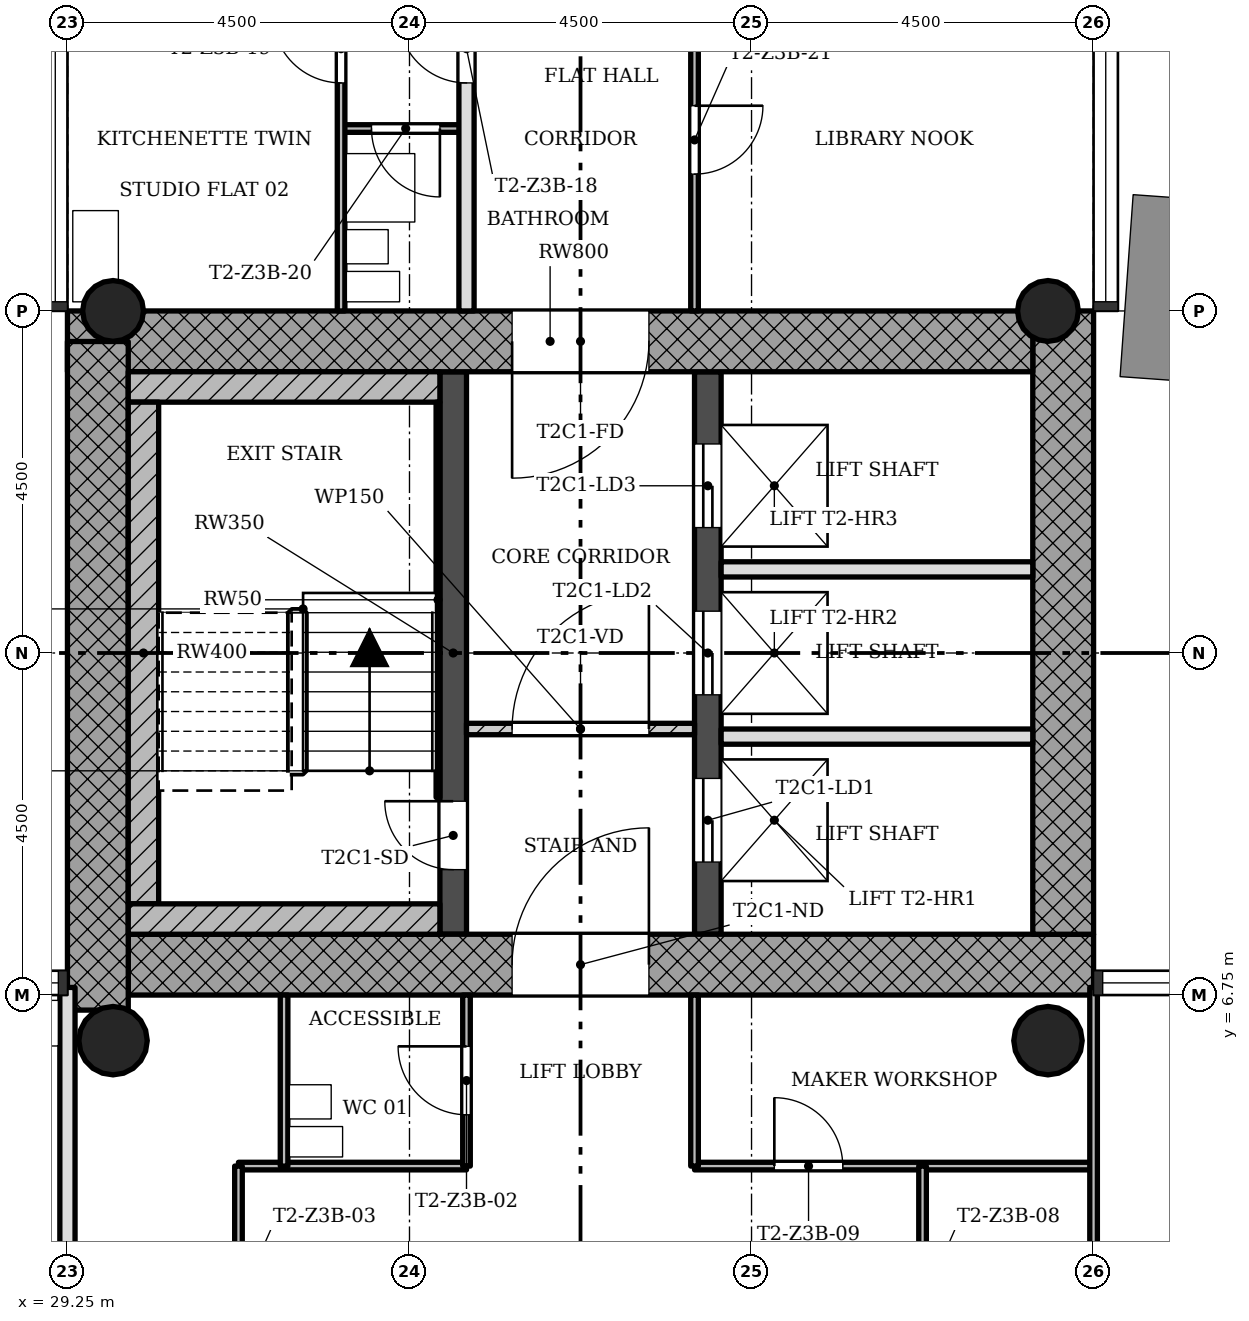
"""IFC4 building model, lengths in metres.
Left out: names, types, materials, properties, quantities, classifications, styles, units other than length and angle.
Written with IfcOpenShell. Run it as: python <this file> out.ifc"""

import sys

from ifc_helpers import new_model, si_unit, direction, frame, frame_2d, origin, origin_2d, place, context, subcontext, project, spatial, rectangle, hollow_circle, extrude, element, fill, save


model = new_model("IFC4")
c1 = context("Model", 3, precision=1e-05, world=origin(), true_north=direction((0.0, 1.0)))
c2 = subcontext(c1, "Body", "Model", "MODEL_VIEW")
j1 = project(units=[si_unit("LENGTHUNIT", "METRE"), si_unit("PLANEANGLEUNIT", "RADIAN")], contexts=[c1])
p1 = place(None, origin())
s1 = spatial("IfcSite", under=j1, at=p1, CompositionType="ELEMENT")
p2 = place(p1, origin())
s2 = spatial("IfcBuilding", under=s1, at=p2, CompositionType="ELEMENT")
p3 = place(p2, frame((0.0, 0.0, 150.7)))
s3 = spatial("IfcBuildingStorey", under=s2, at=p3, CompositionType="ELEMENT", Elevation=150.7)
p4 = place(p3, frame((30.05, 7.15, 0.0), z_axis=(0.0, 0.0, 1.0), x_axis=(1.0, 0.0, 0.0)))
e1 = element("IfcWall", 1, at=p4, inside=s3, PredefinedType="SHEAR", context=c2, shape_type="SweptSolid", body=[
    extrude(rectangle(XDim=12.7, YDim=0.8, at=frame_2d((6.35, 0.0))), origin(), (0.0, 0.0, 1.0), 3.4),
])
p5 = place(p4, frame((5.05, 0.0, 0.0)))
e2 = element("IfcOpeningElement", 2, at=p5, cuts=e1, PredefinedType="OPENING", context=c2, shape_type="SweptSolid", body=[
    extrude(rectangle(XDim=1.8, YDim=2.1, at=frame_2d((0.9, 1.05))), frame((0.0, 0.41, 0.0), z_axis=(0.0, -1.0, 0.0), x_axis=(1.0, 0.0, 0.0)), (0.0, 0.0, 1.0), 0.82),
])
p6 = place(p3, frame((42.35, 7.55, 0.0), z_axis=(0.0, 0.0, 1.0), x_axis=(0.0, 1.0, 0.0)))
e3 = element("IfcWall", 3, at=p6, inside=s3, PredefinedType="SHEAR", context=c2, shape_type="SweptSolid", body=[
    extrude(rectangle(XDim=8.2, YDim=0.8, at=frame_2d((4.1, 0.0))), origin(), (0.0, 0.0, 1.0), 3.4),
])
p7 = place(p3, frame((41.95, 15.35, 0.0), z_axis=(0.0, 0.0, 1.0), x_axis=(-1.0, 0.0, 0.0)))
e4 = element("IfcWall", 4, at=p7, inside=s3, PredefinedType="SHEAR", context=c2, shape_type="SweptSolid", body=[
    extrude(rectangle(XDim=12.7, YDim=0.8, at=frame_2d((6.35, 0.0))), origin(), (0.0, 0.0, 1.0), 3.4),
])
p8 = place(p7, frame((5.05, 0.0, 0.0)))
e5 = element("IfcOpeningElement", 5, at=p8, cuts=e4, PredefinedType="OPENING", context=c2, shape_type="SweptSolid", body=[
    extrude(rectangle(XDim=1.8, YDim=2.1, at=frame_2d((0.9, 1.05))), frame((0.0, 0.41, 0.0), z_axis=(0.0, -1.0, 0.0), x_axis=(1.0, 0.0, 0.0)), (0.0, 0.0, 1.0), 0.82),
])
p9 = place(p3, frame((29.65, 15.348, 0.0), z_axis=(0.0, 0.0, 1.0), x_axis=(0.0, -1.0, 0.0)))
e6 = element("IfcWall", 6, at=p9, inside=s3, PredefinedType="SHEAR", context=c2, shape_type="SweptSolid", body=[
    extrude(rectangle(XDim=8.796, YDim=0.8, at=frame_2d((4.398, 0.0))), origin(), (0.0, 0.0, 1.0), 3.4),
])
p10 = place(p3, frame((34.325, 7.55, 0.0), z_axis=(0.0, 0.0, 1.0), x_axis=(0.0, 1.0, 0.0)))
e7 = element("IfcWall", 7, at=p10, inside=s3, PredefinedType="SHEAR", context=c2, shape_type="SweptSolid", body=[
    extrude(rectangle(XDim=7.4, YDim=0.35, at=frame_2d((3.7, 0.0))), origin(), (0.0, 0.0, 1.0), 3.4),
])
p11 = place(p10, frame((0.85, 0.0, 0.0)))
e8 = element("IfcOpeningElement", 8, at=p11, cuts=e7, PredefinedType="OPENING", context=c2, shape_type="SweptSolid", body=[
    extrude(rectangle(XDim=0.9, YDim=2.1, at=frame_2d((0.45, 1.05))), frame((0.0, 0.185, 0.0), z_axis=(0.0, -1.0, 0.0), x_axis=(1.0, 0.0, 0.0)), (0.0, 0.0, 1.0), 0.37),
])
p12 = place(p3, frame((37.675, 7.55, 0.0), z_axis=(0.0, 0.0, 1.0), x_axis=(0.0, 1.0, 0.0)))
e9 = element("IfcWall", 9, at=p12, inside=s3, PredefinedType="SHEAR", context=c2, shape_type="SweptSolid", body=[
    extrude(rectangle(XDim=7.4, YDim=0.35, at=frame_2d((3.7, 0.0))), origin(), (0.0, 0.0, 1.0), 3.4),
])
p13 = place(p12, frame((0.95, 0.0, 0.0)))
e10 = element("IfcOpeningElement", 10, at=p13, cuts=e9, PredefinedType="OPENING", context=c2, shape_type="SweptSolid", body=[
    extrude(rectangle(XDim=1.1, YDim=2.1, at=frame_2d((0.55, 1.05))), frame((0.0, 0.185, 0.0), z_axis=(0.0, -1.0, 0.0), x_axis=(1.0, 0.0, 0.0)), (0.0, 0.0, 1.0), 0.37),
])
p14 = place(p12, frame((3.15, 0.0, 0.0)))
e11 = element("IfcOpeningElement", 11, at=p14, cuts=e9, PredefinedType="OPENING", context=c2, shape_type="SweptSolid", body=[
    extrude(rectangle(XDim=1.1, YDim=2.1, at=frame_2d((0.55, 1.05))), frame((0.0, 0.185, 0.0), z_axis=(0.0, -1.0, 0.0), x_axis=(1.0, 0.0, 0.0)), (0.0, 0.0, 1.0), 0.37),
])
p15 = place(p12, frame((5.35, 0.0, 0.0)))
e12 = element("IfcOpeningElement", 12, at=p15, cuts=e9, PredefinedType="OPENING", context=c2, shape_type="SweptSolid", body=[
    extrude(rectangle(XDim=1.1, YDim=2.1, at=frame_2d((0.55, 1.05))), frame((0.0, 0.185, 0.0), z_axis=(0.0, -1.0, 0.0), x_axis=(1.0, 0.0, 0.0)), (0.0, 0.0, 1.0), 0.37),
])
for number, where, z_axis, x_axis in (
    (13, (42.15, 15.75, 0.0), (0.0, 0.0, 1.0), (1.0, 0.0, 0.0)),
    (14, (29.85, 15.75, 0.0), (0.0, 0.0, 1.0), (1.0, 0.0, 0.0)),
):
    element("IfcColumn", number, at=place(p3, frame(where, z_axis=z_axis, x_axis=x_axis)), inside=s3, PredefinedType="COLUMN", context=c2, shape_type="SweptSolid", body=[
        extrude(hollow_circle(Radius=0.4, WallThickness=0.028, at=origin_2d()), origin(), (0.0, 0.0, 1.0), 3.4),
    ])
for number, where, z_axis, x_axis in (
    (15, (42.15, 6.15, 0.0), (0.0, 0.0, 1.0), (1.0, 0.0, 0.0)),
    (16, (29.85, 6.15, 0.0), (0.0, 0.0, 1.0), (1.0, 0.0, 0.0)),
):
    element("IfcColumn", number, at=place(p3, frame(where, z_axis=z_axis, x_axis=x_axis)), inside=s3, PredefinedType="COLUMN", context=c2, shape_type="SweptSolid", body=[
        extrude(hollow_circle(Radius=0.45, WallThickness=0.032, at=origin_2d()), origin(), (0.0, 0.0, 1.0), 3.4),
    ])
p16 = place(p3, frame((37.5, 10.25, 0.0), z_axis=(0.0, 0.0, 1.0), x_axis=(-1.0, 0.0, 0.0)))
e17 = element("IfcWall", 17, at=p16, inside=s3, PredefinedType="PARTITIONING", context=c2, shape_type="SweptSolid", body=[
    extrude(rectangle(XDim=3.0, YDim=0.15, at=frame_2d((1.5, 0.0))), origin(), (0.0, 0.0, 1.0), 3.0),
])
p17 = place(p16, frame((0.6, 0.0, 0.0)))
e18 = element("IfcOpeningElement", 18, at=p17, cuts=e17, PredefinedType="OPENING", context=c2, shape_type="SweptSolid", body=[
    extrude(rectangle(XDim=1.8, YDim=2.1, at=frame_2d((0.9, 1.05))), frame((0.0, 0.085, 0.0), z_axis=(0.0, -1.0, 0.0), x_axis=(1.0, 0.0, 0.0)), (0.0, 0.0, 1.0), 0.17),
])
for number, where, z_axis, x_axis in (
    (19, (41.95, 10.15, 0.0), (0.0, 0.0, 1.0), (-1.0, 0.0, 0.0)),
    (20, (41.95, 12.35, 0.0), (0.0, 0.0, 1.0), (-1.0, 0.0, 0.0)),
):
    element("IfcWall", number, at=place(p3, frame(where, z_axis=z_axis, x_axis=x_axis)), inside=s3, PredefinedType="SOLIDWALL", context=c2, shape_type="SweptSolid", body=[
        extrude(rectangle(XDim=4.1, YDim=0.2, at=frame_2d((2.05, 0.0))), origin(), (0.0, 0.0, 1.0), 3.0),
    ])
p18 = place(p3, frame((42.75, 4.5, 0.0), z_axis=(0.0, 0.0, 1.0), x_axis=(-1.0, 0.0, 0.0)))
e21 = element("IfcWall", 21, at=p18, inside=s3, PredefinedType="PARTITIONING", context=c2, shape_type="SweptSolid", body=[
    extrude(rectangle(XDim=5.25, YDim=0.1, at=frame_2d((2.625, 0.0))), origin(), (0.0, 0.0, 1.0), 3.0),
])
p19 = place(p18, frame((3.3, 0.0, 0.0)))
e22 = element("IfcOpeningElement", 22, at=p19, cuts=e21, PredefinedType="OPENING", context=c2, shape_type="SweptSolid", body=[
    extrude(rectangle(XDim=0.9, YDim=2.1, at=frame_2d((0.45, 1.05))), frame((0.0, 0.06, 0.0), z_axis=(0.0, -1.0, 0.0), x_axis=(1.0, 0.0, 0.0)), (0.0, 0.0, 1.0), 0.12),
])
p20 = place(p3, frame((34.5, 4.5, 0.0), z_axis=(0.0, 0.0, 1.0), x_axis=(-1.0, 0.0, 0.0)))
e23 = element("IfcWall", 23, at=p20, inside=s3, PredefinedType="PARTITIONING", context=c2, shape_type="SweptSolid", body=[
    extrude(rectangle(XDim=3.0, YDim=0.1, at=frame_2d((1.5, 0.0))), origin(), (0.0, 0.0, 1.0), 3.0),
])
p21 = place(p3, frame((34.5, 18.15, 0.0), z_axis=(0.0, 0.0, 1.0), x_axis=(-1.0, 0.0, 0.0)))
e24 = element("IfcWall", 24, at=p21, inside=s3, PredefinedType="PARTITIONING", context=c2, shape_type="SweptSolid", body=[
    extrude(rectangle(XDim=1.65, YDim=0.1, at=frame_2d((0.825, 0.0))), origin(), (0.0, 0.0, 1.0), 3.0),
])
p22 = place(p21, frame((0.35, 0.0, 0.0)))
e25 = element("IfcOpeningElement", 25, at=p22, cuts=e24, PredefinedType="OPENING", context=c2, shape_type="SweptSolid", body=[
    extrude(rectangle(XDim=0.9, YDim=2.1, at=frame_2d((0.45, 1.05))), frame((0.0, 0.06, 0.0), z_axis=(0.0, -1.0, 0.0), x_axis=(1.0, 0.0, 0.0)), (0.0, 0.0, 1.0), 0.12),
])
p23 = place(p3, frame((42.75, 0.9, 0.0), z_axis=(0.0, 0.0, 1.0), x_axis=(0.0, 1.0, 0.0)))
e26 = element("IfcWall", 26, at=p23, inside=s3, PredefinedType="PARTITIONING", context=c2, shape_type="SweptSolid", body=[
    extrude(rectangle(XDim=5.95, YDim=0.1, at=frame_2d((2.975, 0.0))), origin(), (0.0, 0.0, 1.0), 3.0),
])
p24 = place(p3, frame((40.5, 0.9, 0.0), z_axis=(0.0, 0.0, 1.0), x_axis=(0.0, 1.0, 0.0)))
e27 = element("IfcWall", 27, at=p24, inside=s3, PredefinedType="PARTITIONING", context=c2, shape_type="SweptSolid", body=[
    extrude(rectangle(XDim=3.6, YDim=0.1, at=frame_2d((1.8, 0.0))), origin(), (0.0, 0.0, 1.0), 3.0),
])
p25 = place(p24, frame((1.35, 0.0, 0.0)))
e28 = element("IfcOpeningElement", 28, at=p25, cuts=e27, PredefinedType="OPENING", context=c2, shape_type="SweptSolid", body=[
    extrude(rectangle(XDim=0.9, YDim=2.1, at=frame_2d((0.45, 1.05))), frame((0.0, 0.06, 0.0), z_axis=(0.0, -1.0, 0.0), x_axis=(1.0, 0.0, 0.0)), (0.0, 0.0, 1.0), 0.12),
])
p26 = place(p3, frame((37.5, 4.5, 0.0), z_axis=(0.0, 0.0, 1.0), x_axis=(0.0, 1.0, 0.0)))
e29 = element("IfcWall", 29, at=p26, inside=s3, PredefinedType="PARTITIONING", context=c2, shape_type="SweptSolid", body=[
    extrude(rectangle(XDim=2.25, YDim=0.1, at=frame_2d((1.125, 0.0))), origin(), (0.0, 0.0, 1.0), 3.0),
])
p27 = place(p3, frame((37.5, 15.75, 0.0), z_axis=(0.0, 0.0, 1.0), x_axis=(0.0, 1.0, 0.0)))
e30 = element("IfcWall", 30, at=p27, inside=s3, PredefinedType="PARTITIONING", context=c2, shape_type="SweptSolid", body=[
    extrude(rectangle(XDim=4.5, YDim=0.1, at=frame_2d((2.25, 0.0))), origin(), (0.0, 0.0, 1.0), 3.0),
])
p28 = place(p27, frame((1.8, 0.0, 0.0)))
e31 = element("IfcOpeningElement", 31, at=p28, cuts=e30, PredefinedType="OPENING", context=c2, shape_type="SweptSolid", body=[
    extrude(rectangle(XDim=0.9, YDim=2.1, at=frame_2d((0.45, 1.05))), frame((0.0, 0.06, 0.0), z_axis=(0.0, -1.0, 0.0), x_axis=(1.0, 0.0, 0.0)), (0.0, 0.0, 1.0), 0.12),
])
p29 = place(p3, frame((34.5, 4.5, 0.0), z_axis=(0.0, 0.0, 1.0), x_axis=(0.0, 1.0, 0.0)))
e32 = element("IfcWall", 32, at=p29, inside=s3, PredefinedType="PARTITIONING", context=c2, shape_type="SweptSolid", body=[
    extrude(rectangle(XDim=2.25, YDim=0.1, at=frame_2d((1.125, 0.0))), origin(), (0.0, 0.0, 1.0), 3.0),
])
p30 = place(p29, frame((0.675, 0.0, 0.0)))
e33 = element("IfcOpeningElement", 33, at=p30, cuts=e32, PredefinedType="OPENING", context=c2, shape_type="SweptSolid", body=[
    extrude(rectangle(XDim=0.9, YDim=2.1, at=frame_2d((0.45, 1.05))), frame((0.0, 0.06, 0.0), z_axis=(0.0, -1.0, 0.0), x_axis=(1.0, 0.0, 0.0)), (0.0, 0.0, 1.0), 0.12),
])
p31 = place(p3, frame((34.5, 15.75, 0.0), z_axis=(0.0, 0.0, 1.0), x_axis=(0.0, 1.0, 0.0)))
e34 = element("IfcWall", 34, at=p31, inside=s3, PredefinedType="SOLIDWALL", context=c2, shape_type="SweptSolid", body=[
    extrude(rectangle(XDim=4.5, YDim=0.2, at=frame_2d((2.25, 0.0))), origin(), (0.0, 0.0, 1.0), 3.0),
])
p32 = place(p31, frame((3.0, 0.0, 0.0)))
e35 = element("IfcOpeningElement", 35, at=p32, cuts=e34, PredefinedType="OPENING", context=c2, shape_type="SweptSolid", body=[
    extrude(rectangle(XDim=0.9, YDim=2.1, at=frame_2d((0.45, 1.05))), frame((0.0, 0.11, 0.0), z_axis=(0.0, -1.0, 0.0), x_axis=(1.0, 0.0, 0.0)), (0.0, 0.0, 1.0), 0.22),
])
p33 = place(p3, frame((32.85, 15.75, 0.0), z_axis=(0.0, 0.0, 1.0), x_axis=(0.0, 1.0, 0.0)))
e36 = element("IfcWall", 36, at=p33, inside=s3, PredefinedType="PARTITIONING", context=c2, shape_type="SweptSolid", body=[
    extrude(rectangle(XDim=4.5, YDim=0.1, at=frame_2d((2.25, 0.0))), origin(), (0.0, 0.0, 1.0), 3.0),
])
p34 = place(p33, frame((3.0, 0.0, 0.0)))
e37 = element("IfcOpeningElement", 37, at=p34, cuts=e36, PredefinedType="OPENING", context=c2, shape_type="SweptSolid", body=[
    extrude(rectangle(XDim=0.9, YDim=2.1, at=frame_2d((0.45, 1.05))), frame((0.0, 0.06, 0.0), z_axis=(0.0, -1.0, 0.0), x_axis=(1.0, 0.0, 0.0)), (0.0, 0.0, 1.0), 0.12),
])
p35 = place(p3, frame((32.1, 4.5, 0.0), z_axis=(0.0, 0.0, 1.0), x_axis=(0.0, 1.0, 0.0)))
e38 = element("IfcWall", 38, at=p35, inside=s3, PredefinedType="PARTITIONING", context=c2, shape_type="SweptSolid", body=[
    extrude(rectangle(XDim=2.25, YDim=0.1, at=frame_2d((1.125, 0.0))), origin(), (0.0, 0.0, 1.0), 3.0),
])
p36 = place(p3, frame((31.5, 0.9, 0.0), z_axis=(0.0, 0.0, 1.0), x_axis=(0.0, 1.0, 0.0)))
e39 = element("IfcWall", 39, at=p36, inside=s3, PredefinedType="PARTITIONING", context=c2, shape_type="SweptSolid", body=[
    extrude(rectangle(XDim=3.6, YDim=0.1, at=frame_2d((1.8, 0.0))), origin(), (0.0, 0.0, 1.0), 3.0),
])
p37 = place(p36, frame((1.35, 0.0, 0.0)))
e40 = element("IfcOpeningElement", 40, at=p37, cuts=e39, PredefinedType="OPENING", context=c2, shape_type="SweptSolid", body=[
    extrude(rectangle(XDim=0.9, YDim=2.1, at=frame_2d((0.45, 1.05))), frame((0.0, 0.06, 0.0), z_axis=(0.0, -1.0, 0.0), x_axis=(1.0, 0.0, 0.0)), (0.0, 0.0, 1.0), 0.12),
])
p38 = place(p3, frame((29.25, 0.9, 0.0), z_axis=(0.0, 0.0, 1.0), x_axis=(0.0, 1.0, 0.0)))
e41 = element("IfcWall", 41, at=p38, inside=s3, PredefinedType="SOLIDWALL", context=c2, shape_type="SweptSolid", body=[
    extrude(rectangle(XDim=5.95, YDim=0.2, at=frame_2d((2.975, 0.0))), origin(), (0.0, 0.0, 1.0), 3.0),
])
p39 = place(p3, frame((34.15, 14.75, 0.0), z_axis=(0.0, 0.0, 1.0), x_axis=(-1.0, 0.0, 0.0)))
e42 = element("IfcWall", 42, at=p39, inside=s3, PredefinedType="SHEAR", context=c2, shape_type="SweptSolid", body=[
    extrude(rectangle(XDim=4.1, YDim=0.4, at=frame_2d((2.05, 0.0))), origin(), (0.0, 0.0, 1.0), 3.4),
])
p40 = place(p3, frame((30.25, 7.95, 0.0), z_axis=(0.0, 0.0, 1.0), x_axis=(0.0, 1.0, 0.0)))
e43 = element("IfcWall", 43, at=p40, inside=s3, PredefinedType="SHEAR", context=c2, shape_type="SweptSolid", body=[
    extrude(rectangle(XDim=6.6, YDim=0.4, at=frame_2d((3.3, 0.0))), origin(), (0.0, 0.0, 1.0), 3.4),
])
p41 = place(p3, frame((34.15, 7.75, 0.0), z_axis=(0.0, 0.0, 1.0), x_axis=(-1.0, 0.0, 0.0)))
e44 = element("IfcWall", 44, at=p41, inside=s3, PredefinedType="SHEAR", context=c2, shape_type="SweptSolid", body=[
    extrude(rectangle(XDim=4.1, YDim=0.4, at=frame_2d((2.05, 0.0))), origin(), (0.0, 0.0, 1.0), 3.4),
])
p42 = place(p3, frame((34.125, 9.35, 0.0), z_axis=(0.0, 0.0, 1.0), x_axis=(0.0, 1.0, 0.0)))
e45 = element("IfcWall", 45, at=p42, inside=s3, PredefinedType="SHEAR", context=c2, shape_type="SweptSolid", body=[
    extrude(rectangle(XDim=5.2, YDim=0.05, at=frame_2d((2.6, 0.0))), origin(), (0.0, 0.0, 1.0), 3.4),
])
p43 = place(p17, origin())
e46 = element("IfcDoor", 46, at=p43, inside=s3, OperationType="SINGLE_SWING_LEFT", PredefinedType="DOOR", context=c2, shape_type="SweptSolid", body=[
    extrude(rectangle(XDim=1.8, YDim=2.1, at=frame_2d((0.9, 1.05))), frame((0.0, 0.025, 0.0), z_axis=(0.0, -1.0, 0.0), x_axis=(1.0, 0.0, 0.0)), (0.0, 0.0, 1.0), 0.05),
])
fill(e18, e46)
p44 = place(p30, origin())
e47 = element("IfcDoor", 47, at=p44, inside=s3, OperationType="SINGLE_SWING_LEFT", PredefinedType="DOOR", context=c2, shape_type="SweptSolid", body=[
    extrude(rectangle(XDim=0.9, YDim=2.1, at=frame_2d((0.45, 1.05))), frame((0.0, 0.025, 0.0), z_axis=(0.0, -1.0, 0.0), x_axis=(1.0, 0.0, 0.0)), (0.0, 0.0, 1.0), 0.05),
])
fill(e33, e47)
p45 = place(p19, origin())
e48 = element("IfcDoor", 48, at=p45, inside=s3, OperationType="SINGLE_SWING_RIGHT", PredefinedType="DOOR", context=c2, shape_type="SweptSolid", body=[
    extrude(rectangle(XDim=0.9, YDim=2.1, at=frame_2d((0.45, 1.05))), frame((0.0, 0.025, 0.0), z_axis=(0.0, -1.0, 0.0), x_axis=(1.0, 0.0, 0.0)), (0.0, 0.0, 1.0), 0.05),
])
fill(e22, e48)
p46 = place(p32, origin())
e49 = element("IfcDoor", 49, at=p46, inside=s3, OperationType="SINGLE_SWING_LEFT", PredefinedType="DOOR", context=c2, shape_type="SweptSolid", body=[
    extrude(rectangle(XDim=0.9, YDim=2.1, at=frame_2d((0.45, 1.05))), frame((0.0, 0.025, 0.0), z_axis=(0.0, -1.0, 0.0), x_axis=(1.0, 0.0, 0.0)), (0.0, 0.0, 1.0), 0.05),
])
fill(e35, e49)
p47 = place(p34, origin())
e50 = element("IfcDoor", 50, at=p47, inside=s3, OperationType="SINGLE_SWING_LEFT", PredefinedType="DOOR", context=c2, shape_type="SweptSolid", body=[
    extrude(rectangle(XDim=0.9, YDim=2.1, at=frame_2d((0.45, 1.05))), frame((0.0, 0.025, 0.0), z_axis=(0.0, -1.0, 0.0), x_axis=(1.0, 0.0, 0.0)), (0.0, 0.0, 1.0), 0.05),
])
fill(e37, e50)
p48 = place(p22, origin())
e51 = element("IfcDoor", 51, at=p48, inside=s3, OperationType="SINGLE_SWING_RIGHT", PredefinedType="DOOR", context=c2, shape_type="SweptSolid", body=[
    extrude(rectangle(XDim=0.9, YDim=2.1, at=frame_2d((0.45, 1.05))), frame((0.0, 0.025, 0.0), z_axis=(0.0, -1.0, 0.0), x_axis=(1.0, 0.0, 0.0)), (0.0, 0.0, 1.0), 0.05),
])
fill(e25, e51)
p49 = place(p28, origin())
e52 = element("IfcDoor", 52, at=p49, inside=s3, OperationType="SINGLE_SWING_RIGHT", PredefinedType="DOOR", context=c2, shape_type="SweptSolid", body=[
    extrude(rectangle(XDim=0.9, YDim=2.1, at=frame_2d((0.45, 1.05))), frame((0.0, 0.025, 0.0), z_axis=(0.0, -1.0, 0.0), x_axis=(1.0, 0.0, 0.0)), (0.0, 0.0, 1.0), 0.05),
])
fill(e31, e52)
p50 = place(p11, origin())
e53 = element("IfcDoor", 53, at=p50, inside=s3, OperationType="SINGLE_SWING_LEFT", PredefinedType="DOOR", context=c2, shape_type="SweptSolid", body=[
    extrude(rectangle(XDim=0.9, YDim=2.1, at=frame_2d((0.45, 1.05))), frame((0.0, 0.025, 0.0), z_axis=(0.0, -1.0, 0.0), x_axis=(1.0, 0.0, 0.0)), (0.0, 0.0, 1.0), 0.05),
])
fill(e8, e53)
p51 = place(p13, origin())
e54 = element("IfcDoor", 54, at=p51, inside=s3, OperationType="SLIDING_TO_LEFT", PredefinedType="DOOR", context=c2, shape_type="SweptSolid", body=[
    extrude(rectangle(XDim=1.1, YDim=2.1, at=frame_2d((0.55, 1.05))), frame((0.0, 0.025, 0.0), z_axis=(0.0, -1.0, 0.0), x_axis=(1.0, 0.0, 0.0)), (0.0, 0.0, 1.0), 0.05),
])
fill(e10, e54)
p52 = place(p14, origin())
e55 = element("IfcDoor", 55, at=p52, inside=s3, OperationType="SLIDING_TO_LEFT", PredefinedType="DOOR", context=c2, shape_type="SweptSolid", body=[
    extrude(rectangle(XDim=1.1, YDim=2.1, at=frame_2d((0.55, 1.05))), frame((0.0, 0.025, 0.0), z_axis=(0.0, -1.0, 0.0), x_axis=(1.0, 0.0, 0.0)), (0.0, 0.0, 1.0), 0.05),
])
fill(e11, e55)
p53 = place(p15, origin())
e56 = element("IfcDoor", 56, at=p53, inside=s3, OperationType="SLIDING_TO_LEFT", PredefinedType="DOOR", context=c2, shape_type="SweptSolid", body=[
    extrude(rectangle(XDim=1.1, YDim=2.1, at=frame_2d((0.55, 1.05))), frame((0.0, 0.025, 0.0), z_axis=(0.0, -1.0, 0.0), x_axis=(1.0, 0.0, 0.0)), (0.0, 0.0, 1.0), 0.05),
])
fill(e12, e56)
p54 = place(p5, origin())
e57 = element("IfcDoor", 57, at=p54, inside=s3, OperationType="SINGLE_SWING_LEFT", PredefinedType="DOOR", context=c2, shape_type="SweptSolid", body=[
    extrude(rectangle(XDim=1.8, YDim=2.1, at=frame_2d((0.9, 1.05))), frame((0.0, 0.025, 0.0), z_axis=(0.0, -1.0, 0.0), x_axis=(1.0, 0.0, 0.0)), (0.0, 0.0, 1.0), 0.05),
])
fill(e2, e57)
p55 = place(p8, origin())
e58 = element("IfcDoor", 58, at=p55, inside=s3, OperationType="SINGLE_SWING_LEFT", PredefinedType="DOOR", context=c2, shape_type="SweptSolid", body=[
    extrude(rectangle(XDim=1.8, YDim=2.1, at=frame_2d((0.9, 1.05))), frame((0.0, 0.025, 0.0), z_axis=(0.0, -1.0, 0.0), x_axis=(1.0, 0.0, 0.0)), (0.0, 0.0, 1.0), 0.05),
])
fill(e5, e58)
save(model, sys.argv[1])
